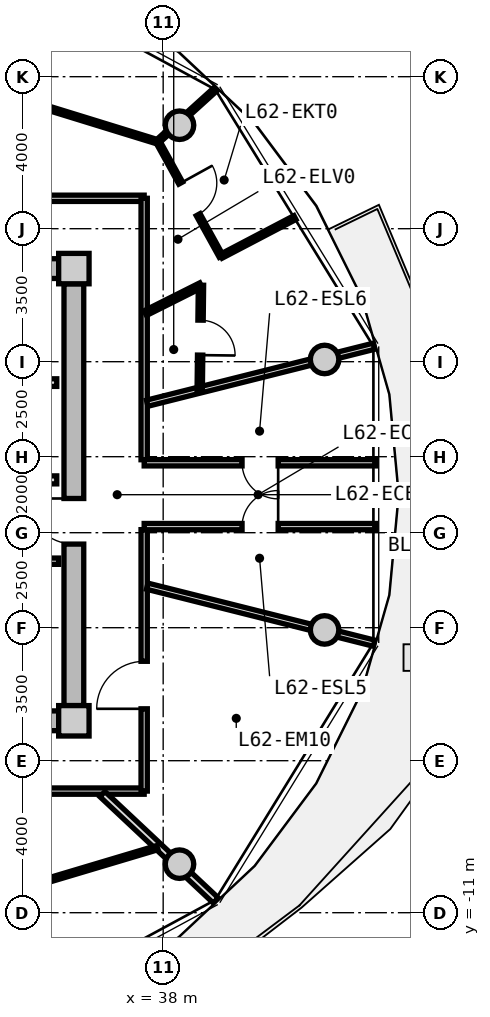
"""IFC4 building model, lengths in metres.
Left out: names, types, materials, properties, quantities, classifications, styles, units other than length and angle.
Written with IfcOpenShell. Run it as: python <this file> out.ifc"""

import sys

from ifc_helpers import new_model, si_unit, direction, frame, frame_2d, origin, origin_2d, place, context, subcontext, project, spatial, rectangle, circle, extrude, source, transform, mapped, element, fill, save


model = new_model("IFC4")
c1 = context("Model", 3, precision=1e-05, world=origin(), true_north=direction((0.0, 1.0)))
c2 = subcontext(c1, "Body", "Model", "MODEL_VIEW")
j1 = project(units=[si_unit("LENGTHUNIT", "METRE"), si_unit("PLANEANGLEUNIT", "RADIAN")], contexts=[c1])
p1 = place(None, origin())
s1 = spatial("IfcSite", under=j1, at=p1, CompositionType="ELEMENT")
p2 = place(p1, origin())
s2 = spatial("IfcBuilding", under=s1, at=p2, CompositionType="ELEMENT")
p3 = place(p2, frame((0.0, 0.0, 199.8)))
s3 = spatial("IfcBuildingStorey", under=s2, at=p3, CompositionType="ELEMENT", Elevation=199.8)
m1 = source(origin(), c2, "Body", "SweptSolid", [
    extrude(rectangle(XDim=0.8, YDim=0.8, at=origin_2d()), origin(), (0.0, 0.0, 1.0), 4.0),
])
for number, where, z_axis, x_axis in (
    (1, (35.65, -5.95, 0.0), (0.0, 0.0, 1.0), (1.0, 0.0, 0.0)),
    (2, (35.65, 5.95, 0.0), (0.0, 0.0, 1.0), (1.0, 0.0, 0.0)),
):
    element("IfcColumn", number, at=place(p3, frame(where, z_axis=z_axis, x_axis=x_axis)), inside=s3, PredefinedType="COLUMN", context=c2, shape_type="MappedRepresentation", body=[
        mapped(m1, transform((0.0, 0.0, 0.0), x_axis=(1.0, 0.0, 0.0), y_axis=(0.0, 1.0, 0.0), z_axis=(0.0, 0.0, 1.0), scale=1.0)),
    ])
m2 = source(origin(), c2, "Body", "SweptSolid", [
    extrude(rectangle(XDim=14.5, YDim=0.52, at=frame_2d((7.25, 0.0))), origin(), (0.0, 0.0, 1.0), 3.71),
])
for number, where, z_axis, x_axis in (
    (3, (20.75, 5.95, 0.0), (0.0, 0.0, 1.0), (1.0, 0.0, 0.0)),
    (4, (35.25, -5.95, 0.0), (0.0, 0.0, 1.0), (-1.0, 0.0, 0.0)),
):
    element("IfcWall", number, at=place(p3, frame(where, z_axis=z_axis, x_axis=x_axis)), inside=s3, PredefinedType="SHEAR", context=c2, shape_type="MappedRepresentation", body=[
        mapped(m2, transform((0.0, 0.0, 0.0), x_axis=(1.0, 0.0, 0.0), y_axis=(0.0, 1.0, 0.0), z_axis=(0.0, 0.0, 1.0), scale=1.0)),
    ])
m3 = source(origin(), c2, "Body", "SweptSolid", [
    extrude(rectangle(XDim=11.1, YDim=0.52, at=frame_2d((5.55, 0.0))), origin(), (0.0, 0.0, 1.0), 3.71),
])
p4 = place(p3, frame((35.65, 5.55, 0.0), z_axis=(0.0, 0.0, 1.0), x_axis=(0.0, -1.0, 0.0)))
e5 = element("IfcWall", 5, at=p4, inside=s3, PredefinedType="SHEAR", context=c2, shape_type="MappedRepresentation", body=[
    mapped(m3, transform((0.0, 0.0, 0.0), x_axis=(1.0, 0.0, 0.0), y_axis=(0.0, 1.0, 0.0), z_axis=(0.0, 0.0, 1.0), scale=1.0)),
])
p5 = place(p4, frame((5.65, 0.0, 0.0)))
e6 = element("IfcOpeningElement", 6, at=p5, cuts=e5, PredefinedType="OPENING", context=c2, shape_type="SweptSolid", body=[
    extrude(rectangle(XDim=1.2, YDim=2.15, at=frame_2d((0.6, 1.075))), frame((0.0, 0.27, 0.0), z_axis=(0.0, -1.0, 0.0), x_axis=(1.0, 0.0, 0.0)), (0.0, 0.0, 1.0), 0.54),
])
m4 = source(origin(), c2, "Body", "SweptSolid", [
    extrude(circle(Radius=0.375, at=origin_2d()), origin(), (0.0, 0.0, 1.0), 4.0),
])
for number, where, z_axis, x_axis in (
    (7, (42.247, 3.559, 0.0), (0.0, 0.0, 1.0), (1.0, 0.0, 0.0)),
    (8, (38.43, 9.723, 0.0), (0.0, 0.0, 1.0), (1.0, 0.0, 0.0)),
    (9, (38.43, -9.723, 0.0), (0.0, 0.0, 1.0), (1.0, 0.0, 0.0)),
    (10, (42.247, -3.559, 0.0), (0.0, 0.0, 1.0), (1.0, 0.0, 0.0)),
):
    element("IfcColumn", number, at=place(p3, frame(where, z_axis=z_axis, x_axis=x_axis)), inside=s3, PredefinedType="COLUMN", context=c2, shape_type="MappedRepresentation", body=[
        mapped(m4, transform((0.0, 0.0, 0.0), x_axis=(1.0, 0.0, 0.0), y_axis=(0.0, 1.0, 0.0), z_axis=(0.0, 0.0, 1.0), scale=1.0)),
    ])
m5 = source(origin(), c2, "Body", "SweptSolid", [
    extrude(rectangle(XDim=3.2, YDim=0.2, at=frame_2d((1.6, 0.0))), origin(), (0.0, 0.0, 1.0), 3.695),
])
p6 = place(p3, frame((32.0, 2.95, 0.0), z_axis=(0.0, 0.0, 1.0), x_axis=(1.0, 0.0, 0.0)))
e11 = element("IfcWall", 11, at=p6, inside=s3, PredefinedType="PARTITIONING", context=c2, shape_type="MappedRepresentation", body=[
    mapped(m5, transform((0.0, 0.0, 0.0), x_axis=(1.0, 0.0, 0.0), y_axis=(0.0, 1.0, 0.0), z_axis=(0.0, 0.0, 1.0), scale=1.0)),
])
m6 = source(origin(), c2, "Body", "SweptSolid", [
    extrude(rectangle(XDim=6.66, YDim=0.21, at=frame_2d((3.33, 0.0))), origin(), (0.0, 0.0, 1.0), 3.695),
])
p7 = place(p3, frame((28.54, 0.39, 0.0), z_axis=(0.0, 0.0, 1.0), x_axis=(1.0, 0.0, 0.0)))
e12 = element("IfcWall", 12, at=p7, inside=s3, PredefinedType="PARTITIONING", context=c2, shape_type="MappedRepresentation", body=[
    mapped(m6, transform((0.0, 0.0, 0.0), x_axis=(1.0, 0.0, 0.0), y_axis=(0.0, 1.0, 0.0), z_axis=(0.0, 0.0, 1.0), scale=1.0)),
])
p8 = place(p7, frame((1.0, 0.0, 0.0)))
e13 = element("IfcOpeningElement", 13, at=p8, cuts=e12, PredefinedType="OPENING", context=c2, shape_type="SweptSolid", body=[
    extrude(rectangle(XDim=1.2, YDim=2.15, at=frame_2d((0.6, 1.075))), frame((0.0, 0.115, 0.0), z_axis=(0.0, -1.0, 0.0), x_axis=(1.0, 0.0, 0.0)), (0.0, 0.0, 1.0), 0.23),
])
m7 = source(origin(), c2, "Body", "SweptSolid", [
    extrude(rectangle(XDim=2.7, YDim=0.165, at=frame_2d((1.35, 0.0))), origin(), (0.0, 0.0, 1.0), 3.695),
])
p9 = place(p3, frame((32.55, -1.75, 0.0), z_axis=(0.0, 0.0, 1.0), x_axis=(1.0, 0.0, 0.0)))
e14 = element("IfcWall", 14, at=p9, inside=s3, PredefinedType="PARTITIONING", context=c2, shape_type="MappedRepresentation", body=[
    mapped(m7, transform((0.0, 0.0, 0.0), x_axis=(1.0, 0.0, 0.0), y_axis=(0.0, 1.0, 0.0), z_axis=(0.0, 0.0, 1.0), scale=1.0)),
])
p10 = place(p9, frame((0.222, 0.0, 0.0)))
e15 = element("IfcOpeningElement", 15, at=p10, cuts=e14, PredefinedType="OPENING", context=c2, shape_type="SweptSolid", body=[
    extrude(rectangle(XDim=0.925, YDim=2.1, at=frame_2d((0.462, 1.05))), frame((0.0, 0.093, 0.0), z_axis=(0.0, -1.0, 0.0), x_axis=(1.0, 0.0, 0.0)), (0.0, 0.0, 1.0), 0.185),
])
p11 = place(p9, frame((1.522, 0.0, 0.0)))
e16 = element("IfcOpeningElement", 16, at=p11, cuts=e14, PredefinedType="OPENING", context=c2, shape_type="SweptSolid", body=[
    extrude(rectangle(XDim=0.925, YDim=2.1, at=frame_2d((0.462, 1.05))), frame((0.0, 0.093, 0.0), z_axis=(0.0, -1.0, 0.0), x_axis=(1.0, 0.0, 0.0)), (0.0, 0.0, 1.0), 0.185),
])
m8 = source(origin(), c2, "Body", "SweptSolid", [
    extrude(rectangle(XDim=8.58, YDim=0.165, at=frame_2d((4.29, 0.0))), origin(), (0.0, 0.0, 1.0), 3.695),
])
p12 = place(p3, frame((28.92, 7.8, 0.0), z_axis=(0.0, 0.0, 1.0), x_axis=(1.0, 0.0, 0.0)))
e17 = element("IfcWall", 17, at=p12, inside=s3, PredefinedType="PARTITIONING", context=c2, shape_type="MappedRepresentation", body=[
    mapped(m8, transform((0.0, 0.0, 0.0), x_axis=(1.0, 0.0, 0.0), y_axis=(0.0, 1.0, 0.0), z_axis=(0.0, 0.0, 1.0), scale=1.0)),
])
p13 = place(p12, frame((4.32, 0.0, 0.0)))
e18 = element("IfcOpeningElement", 18, at=p13, cuts=e17, PredefinedType="OPENING", context=c2, shape_type="SweptSolid", body=[
    extrude(rectangle(XDim=1.05, YDim=2.15, at=frame_2d((0.525, 1.075))), frame((0.0, 0.093, 0.0), z_axis=(0.0, -1.0, 0.0), x_axis=(1.0, 0.0, 0.0)), (0.0, 0.0, 1.0), 0.185),
])
m9 = source(origin(), c2, "Body", "SweptSolid", [
    extrude(rectangle(XDim=19.0, YDim=0.165, at=frame_2d((9.5, 0.0))), origin(), (0.0, 0.0, 1.0), 3.695),
])
p14 = place(p3, frame((37.5, -7.8, 0.0), z_axis=(0.0, 0.0, 1.0), x_axis=(-1.0, 0.0, 0.0)))
e19 = element("IfcWall", 19, at=p14, inside=s3, PredefinedType="PARTITIONING", context=c2, shape_type="MappedRepresentation", body=[
    mapped(m9, transform((0.0, 0.0, 0.0), x_axis=(1.0, 0.0, 0.0), y_axis=(0.0, 1.0, 0.0), z_axis=(0.0, 0.0, 1.0), scale=1.0)),
])
p15 = place(p14, frame((9.392, 0.0, 0.0)))
e20 = element("IfcOpeningElement", 20, at=p15, cuts=e19, PredefinedType="OPENING", context=c2, shape_type="SweptSolid", body=[
    extrude(rectangle(XDim=1.05, YDim=2.15, at=frame_2d((0.525, 1.075))), frame((0.0, 0.093, 0.0), z_axis=(0.0, -1.0, 0.0), x_axis=(1.0, 0.0, 0.0)), (0.0, 0.0, 1.0), 0.185),
])
m10 = source(origin(), c2, "Body", "SweptSolid", [
    extrude(rectangle(XDim=6.88, YDim=0.165, at=frame_2d((3.44, 0.0))), origin(), (0.0, 0.0, 1.0), 3.695),
])
p16 = place(p3, frame((37.5, 7.8, 0.0), z_axis=(0.0, 0.0, 1.0), x_axis=(0.0, -1.0, 0.0)))
e21 = element("IfcWall", 21, at=p16, inside=s3, PredefinedType="PARTITIONING", context=c2, shape_type="MappedRepresentation", body=[
    mapped(m10, transform((0.0, 0.0, 0.0), x_axis=(1.0, 0.0, 0.0), y_axis=(0.0, 1.0, 0.0), z_axis=(0.0, 0.0, 1.0), scale=1.0)),
])
p17 = place(p3, frame((37.5, -0.92, 0.0), z_axis=(0.0, 0.0, 1.0), x_axis=(0.0, -1.0, 0.0)))
e22 = element("IfcWall", 22, at=p17, inside=s3, PredefinedType="PARTITIONING", context=c2, shape_type="MappedRepresentation", body=[
    mapped(m10, transform((0.0, 0.0, 0.0), x_axis=(1.0, 0.0, 0.0), y_axis=(0.0, 1.0, 0.0), z_axis=(0.0, 0.0, 1.0), scale=1.0)),
])
p18 = place(p17, frame((3.464, 0.0, 0.0)))
e23 = element("IfcOpeningElement", 23, at=p18, cuts=e22, PredefinedType="OPENING", context=c2, shape_type="SweptSolid", body=[
    extrude(rectangle(XDim=1.25, YDim=2.2, at=frame_2d((0.625, 1.1))), frame((0.0, 0.093, 0.0), z_axis=(0.0, -1.0, 0.0), x_axis=(1.0, 0.0, 0.0)), (0.0, 0.0, 1.0), 0.185),
])
m11 = source(origin(), c2, "Body", "SweptSolid", [
    extrude(rectangle(XDim=6.157, YDim=0.165, at=frame_2d((3.079, 0.0))), origin(), (0.0, 0.0, 1.0), 3.295),
])
for number, where, z_axis, x_axis in (
    (24, (37.58, -2.407, 0.0), (0.0, 0.0, 1.0), (0.97, -0.244, 0.0)),
    (25, (37.58, 2.407, 0.0), (0.0, 0.0, 1.0), (0.97, 0.244, 0.0)),
):
    element("IfcWall", number, at=place(p3, frame(where, z_axis=z_axis, x_axis=x_axis)), inside=s3, PredefinedType="PARTITIONING", context=c2, shape_type="MappedRepresentation", body=[
        mapped(m11, transform((0.0, 0.0, 0.0), x_axis=(1.0, 0.0, 0.0), y_axis=(0.0, 1.0, 0.0), z_axis=(0.0, 0.0, 1.0), scale=1.0)),
    ])
m12 = source(origin(), c2, "Body", "SweptSolid", [
    extrude(rectangle(XDim=6.101, YDim=0.165, at=frame_2d((3.051, 0.0))), origin(), (0.0, 0.0, 1.0), 3.695),
])
p19 = place(p3, frame((37.5, 0.84, 0.0), z_axis=(0.0, 0.0, 1.0), x_axis=(1.0, 0.0, 0.0)))
e26 = element("IfcWall", 26, at=p19, inside=s3, PredefinedType="PARTITIONING", context=c2, shape_type="MappedRepresentation", body=[
    mapped(m12, transform((0.0, 0.0, 0.0), x_axis=(1.0, 0.0, 0.0), y_axis=(0.0, 1.0, 0.0), z_axis=(0.0, 0.0, 1.0), scale=1.0)),
])
p20 = place(p19, frame((2.576, 0.0, 0.0)))
e27 = element("IfcOpeningElement", 27, at=p20, cuts=e26, PredefinedType="OPENING", context=c2, shape_type="SweptSolid", body=[
    extrude(rectangle(XDim=0.95, YDim=2.1, at=frame_2d((0.475, 1.05))), frame((0.0, 0.093, 0.0), z_axis=(0.0, -1.0, 0.0), x_axis=(1.0, 0.0, 0.0)), (0.0, 0.0, 1.0), 0.185),
])
p21 = place(p3, frame((43.601, -0.84, 0.0), z_axis=(0.0, 0.0, 1.0), x_axis=(-1.0, 0.0, 0.0)))
e28 = element("IfcWall", 28, at=p21, inside=s3, PredefinedType="PARTITIONING", context=c2, shape_type="MappedRepresentation", body=[
    mapped(m12, transform((0.0, 0.0, 0.0), x_axis=(1.0, 0.0, 0.0), y_axis=(0.0, 1.0, 0.0), z_axis=(0.0, 0.0, 1.0), scale=1.0)),
])
p22 = place(p21, frame((2.576, 0.0, 0.0)))
e29 = element("IfcOpeningElement", 29, at=p22, cuts=e28, PredefinedType="OPENING", context=c2, shape_type="SweptSolid", body=[
    extrude(rectangle(XDim=0.95, YDim=2.1, at=frame_2d((0.475, 1.05))), frame((0.0, 0.093, 0.0), z_axis=(0.0, -1.0, 0.0), x_axis=(1.0, 0.0, 0.0)), (0.0, 0.0, 1.0), 0.185),
])
m13 = source(origin(), c2, "Body", "SweptSolid", [
    extrude(rectangle(XDim=6.919, YDim=0.115, at=frame_2d((3.459, 0.0))), origin(), (0.0, 0.0, 1.0), 3.695),
])
p23 = place(p3, frame((37.849, 9.287, 0.0), z_axis=(0.0, 0.0, 1.0), x_axis=(-0.955678249072, 0.294413118341, 0.0)))
e30 = element("IfcWall", 30, at=p23, inside=s3, PredefinedType="PARTITIONING", context=c2, shape_type="MappedRepresentation", body=[
    mapped(m13, transform((0.0, 0.0, 0.0), x_axis=(1.0, 0.0, 0.0), y_axis=(0.0, 1.0, 0.0), z_axis=(0.0, 0.0, 1.0), scale=1.0)),
])
p24 = place(p23, frame((2.985, 0.0, 0.0)))
e31 = element("IfcOpeningElement", 31, at=p24, cuts=e30, PredefinedType="OPENING", context=c2, shape_type="SweptSolid", body=[
    extrude(rectangle(XDim=0.95, YDim=2.1, at=frame_2d((0.475, 1.05))), frame((0.0, 0.067, 0.0), z_axis=(0.0, -1.0, 0.0), x_axis=(1.0, 0.0, 0.0)), (0.0, 0.0, 1.0), 0.135),
])
m14 = source(origin(), c2, "Body", "SweptSolid", [
    extrude(rectangle(XDim=2.072, YDim=0.115, at=frame_2d((1.036, 0.0))), origin(), (0.0, 0.0, 1.0), 3.295),
])
p25 = place(p3, frame((37.849, 9.287, 0.0), z_axis=(0.0, 0.0, 1.0), x_axis=(0.741410125356, 0.671052178314, 0.0)))
e32 = element("IfcWall", 32, at=p25, inside=s3, PredefinedType="PARTITIONING", context=c2, shape_type="MappedRepresentation", body=[
    mapped(m14, transform((0.0, 0.0, 0.0), x_axis=(1.0, 0.0, 0.0), y_axis=(0.0, 1.0, 0.0), z_axis=(0.0, 0.0, 1.0), scale=1.0)),
])
m15 = source(origin(), c2, "Body", "SweptSolid", [
    extrude(rectangle(XDim=1.638, YDim=0.14, at=frame_2d((0.819, 0.0))), origin(), (0.0, 0.0, 1.0), 3.695),
])
p26 = place(p3, frame((37.53, 4.778, 0.0), z_axis=(0.0, 0.0, 1.0), x_axis=(0.893919977945, 0.448226586707, 0.0)))
e33 = element("IfcWall", 33, at=p26, inside=s3, PredefinedType="PARTITIONING", context=c2, shape_type="MappedRepresentation", body=[
    mapped(m15, transform((0.0, 0.0, 0.0), x_axis=(1.0, 0.0, 0.0), y_axis=(0.0, 1.0, 0.0), z_axis=(0.0, 0.0, 1.0), scale=1.0)),
])
m16 = source(origin(), c2, "Body", "SweptSolid", [
    extrude(rectangle(XDim=2.759, YDim=0.14, at=frame_2d((1.379, 0.0))), origin(), (0.0, 0.0, 1.0), 3.695),
])
p27 = place(p3, frame((38.995, 5.513, 0.0), z_axis=(0.0, 0.0, 1.0), x_axis=(-0.01194710728, -0.999928630767, 0.0)))
e34 = element("IfcWall", 34, at=p27, inside=s3, PredefinedType="PARTITIONING", context=c2, shape_type="MappedRepresentation", body=[
    mapped(m16, transform((0.0, 0.0, 0.0), x_axis=(1.0, 0.0, 0.0), y_axis=(0.0, 1.0, 0.0), z_axis=(0.0, 0.0, 1.0), scale=1.0)),
])
p28 = place(p27, frame((0.919, 0.0, 0.0)))
e35 = element("IfcOpeningElement", 35, at=p28, cuts=e34, PredefinedType="OPENING", context=c2, shape_type="SweptSolid", body=[
    extrude(rectangle(XDim=0.92, YDim=2.1, at=frame_2d((0.46, 1.05))), frame((0.0, 0.08, 0.0), z_axis=(0.0, -1.0, 0.0), x_axis=(1.0, 0.0, 0.0)), (0.0, 0.0, 1.0), 0.16),
])
m17 = source(origin(), c2, "Body", "SweptSolid", [
    extrude(rectangle(XDim=2.193, YDim=0.115, at=frame_2d((1.097, 0.0))), origin(), (0.0, 0.0, 1.0), 3.695),
])
p29 = place(p3, frame((39.525, 6.275, 0.0), z_axis=(0.0, 0.0, 1.0), x_axis=(0.885783595046, 0.464098505435, 0.0)))
e36 = element("IfcWall", 36, at=p29, inside=s3, PredefinedType="PARTITIONING", context=c2, shape_type="MappedRepresentation", body=[
    mapped(m17, transform((0.0, 0.0, 0.0), x_axis=(1.0, 0.0, 0.0), y_axis=(0.0, 1.0, 0.0), z_axis=(0.0, 0.0, 1.0), scale=1.0)),
])
m18 = source(origin(), c2, "Body", "SweptSolid", [
    extrude(rectangle(XDim=3.45, YDim=0.115, at=frame_2d((1.725, 0.0))), origin(), (0.0, 0.0, 1.0), 3.695),
])
p30 = place(p3, frame((39.525, 6.275, 0.0), z_axis=(0.0, 0.0, 1.0), x_axis=(-0.483659007882, 0.875256513312, 0.0)))
e37 = element("IfcWall", 37, at=p30, inside=s3, PredefinedType="PARTITIONING", context=c2, shape_type="MappedRepresentation", body=[
    mapped(m18, transform((0.0, 0.0, 0.0), x_axis=(1.0, 0.0, 0.0), y_axis=(0.0, 1.0, 0.0), z_axis=(0.0, 0.0, 1.0), scale=1.0)),
])
p31 = place(p30, frame((1.25, 0.0, 0.0)))
e38 = element("IfcOpeningElement", 38, at=p31, cuts=e37, PredefinedType="OPENING", context=c2, shape_type="SweptSolid", body=[
    extrude(rectangle(XDim=0.95, YDim=2.1, at=frame_2d((0.475, 1.05))), frame((0.0, 0.067, 0.0), z_axis=(0.0, -1.0, 0.0), x_axis=(1.0, 0.0, 0.0)), (0.0, 0.0, 1.0), 0.135),
])
m19 = source(origin(), c2, "Body", "SweptSolid", [
    extrude(rectangle(XDim=4.089, YDim=0.19, at=frame_2d((2.044, 0.0))), origin(), (0.0, 0.0, 1.0), 3.295),
])
p32 = place(p3, frame((36.402, -7.88, 0.0), z_axis=(0.0, 0.0, 1.0), x_axis=(0.729401273609, -0.684086092577, 0.0)))
e39 = element("IfcWall", 39, at=p32, inside=s3, PredefinedType="PARTITIONING", context=c2, shape_type="MappedRepresentation", body=[
    mapped(m19, transform((0.0, 0.0, 0.0), x_axis=(1.0, 0.0, 0.0), y_axis=(0.0, 1.0, 0.0), z_axis=(0.0, 0.0, 1.0), scale=1.0)),
])
m20 = source(origin(), c2, "Body", "SweptSolid", [
    extrude(rectangle(XDim=6.936, YDim=0.115, at=frame_2d((3.468, 0.0))), origin(), (0.0, 0.0, 1.0), 3.695),
])
p33 = place(p3, frame((31.203, -11.272, 0.0), z_axis=(0.0, 0.0, 1.0), x_axis=(0.958186895835, 0.286143098205, 0.0)))
e40 = element("IfcWall", 40, at=p33, inside=s3, PredefinedType="PARTITIONING", context=c2, shape_type="MappedRepresentation", body=[
    mapped(m20, transform((0.0, 0.0, 0.0), x_axis=(1.0, 0.0, 0.0), y_axis=(0.0, 1.0, 0.0), z_axis=(0.0, 0.0, 1.0), scale=1.0)),
])
p34 = place(p33, frame((2.993, 0.0, 0.0)))
e41 = element("IfcOpeningElement", 41, at=p34, cuts=e40, PredefinedType="OPENING", context=c2, shape_type="SweptSolid", body=[
    extrude(rectangle(XDim=0.95, YDim=2.1, at=frame_2d((0.475, 1.05))), frame((0.0, 0.067, 0.0), z_axis=(0.0, -1.0, 0.0), x_axis=(1.0, 0.0, 0.0)), (0.0, 0.0, 1.0), 0.135),
])
m21 = source(origin(), c2, "Body", "SweptSolid", [
    extrude(rectangle(XDim=1.2, YDim=2.15, at=frame_2d((0.6, 1.075))), frame((0.0, 0.025, 0.0), z_axis=(0.0, -1.0, 0.0), x_axis=(1.0, 0.0, 0.0)), (0.0, 0.0, 1.0), 0.05),
])
p35 = place(p5, frame((1.2, 0.0, 0.0), z_axis=(0.0, 0.0, 1.0), x_axis=(-1.0, 0.0, 0.0)))
e42 = element("IfcDoor", 42, at=p35, inside=s3, OperationType="SINGLE_SWING_RIGHT", PredefinedType="DOOR", context=c2, shape_type="MappedRepresentation", body=[
    mapped(m21, transform((0.0, 0.0, 0.0), x_axis=(1.0, 0.0, 0.0), y_axis=(0.0, 1.0, 0.0), z_axis=(0.0, 0.0, 1.0), scale=1.0)),
])
fill(e6, e42)
m22 = source(origin(), c2, "Body", "SweptSolid", [
    extrude(rectangle(XDim=0.95, YDim=2.1, at=frame_2d((0.475, 1.05))), frame((0.0, 0.025, 0.0), z_axis=(0.0, -1.0, 0.0), x_axis=(1.0, 0.0, 0.0)), (0.0, 0.0, 1.0), 0.05),
])
p36 = place(p22, frame((0.95, 0.0, 0.0), z_axis=(0.0, 0.0, 1.0), x_axis=(-1.0, 0.0, 0.0)))
e43 = element("IfcDoor", 43, at=p36, inside=s3, OperationType="SINGLE_SWING_RIGHT", PredefinedType="DOOR", context=c2, shape_type="MappedRepresentation", body=[
    mapped(m22, transform((0.0, 0.0, 0.0), x_axis=(1.0, 0.0, 0.0), y_axis=(0.0, 1.0, 0.0), z_axis=(0.0, 0.0, 1.0), scale=1.0)),
])
fill(e29, e43)
p37 = place(p20, frame((0.95, 0.0, 0.0), z_axis=(0.0, 0.0, 1.0), x_axis=(-1.0, 0.0, 0.0)))
e44 = element("IfcDoor", 44, at=p37, inside=s3, OperationType="SINGLE_SWING_LEFT", PredefinedType="DOOR", context=c2, shape_type="MappedRepresentation", body=[
    mapped(m22, transform((0.0, 0.0, 0.0), x_axis=(1.0, 0.0, 0.0), y_axis=(0.0, 1.0, 0.0), z_axis=(0.0, 0.0, 1.0), scale=1.0)),
])
fill(e27, e44)
m23 = source(origin(), c2, "Body", "SweptSolid", [
    extrude(rectangle(XDim=0.92, YDim=2.1, at=frame_2d((0.46, 1.05))), frame((0.0, 0.025, 0.0), z_axis=(0.0, -1.0, 0.0), x_axis=(1.0, 0.0, 0.0)), (0.0, 0.0, 1.0), 0.05),
])
p38 = place(p28, origin())
e45 = element("IfcDoor", 45, at=p38, inside=s3, OperationType="SINGLE_SWING_RIGHT", PredefinedType="DOOR", context=c2, shape_type="MappedRepresentation", body=[
    mapped(m23, transform((0.0, 0.0, 0.0), x_axis=(1.0, 0.0, 0.0), y_axis=(0.0, 1.0, 0.0), z_axis=(0.0, 0.0, 1.0), scale=1.0)),
])
fill(e35, e45)
p39 = place(p31, frame((0.95, 0.0, 0.0), z_axis=(0.0, 0.0, 1.0), x_axis=(-1.0, 0.0, 0.0)))
e46 = element("IfcDoor", 46, at=p39, inside=s3, OperationType="SINGLE_SWING_LEFT", PredefinedType="DOOR", context=c2, shape_type="MappedRepresentation", body=[
    mapped(m22, transform((0.0, 0.0, 0.0), x_axis=(1.0, 0.0, 0.0), y_axis=(0.0, 1.0, 0.0), z_axis=(0.0, 0.0, 1.0), scale=1.0)),
])
fill(e38, e46)
m24 = source(origin(), c2, "Body", "SweptSolid", [
    extrude(rectangle(XDim=1.25, YDim=2.2, at=frame_2d((0.625, 1.1))), frame((0.0, 0.025, 0.0), z_axis=(0.0, -1.0, 0.0), x_axis=(1.0, 0.0, 0.0)), (0.0, 0.0, 1.0), 0.05),
])
p40 = place(p18, frame((1.25, 0.0, 0.0), z_axis=(0.0, 0.0, 1.0), x_axis=(-1.0, 0.0, 0.0)))
e47 = element("IfcDoor", 47, at=p40, inside=s3, OperationType="SINGLE_SWING_LEFT", PredefinedType="DOOR", context=c2, shape_type="MappedRepresentation", body=[
    mapped(m24, transform((0.0, 0.0, 0.0), x_axis=(1.0, 0.0, 0.0), y_axis=(0.0, 1.0, 0.0), z_axis=(0.0, 0.0, 1.0), scale=1.0)),
])
fill(e23, e47)
save(model, sys.argv[1])
